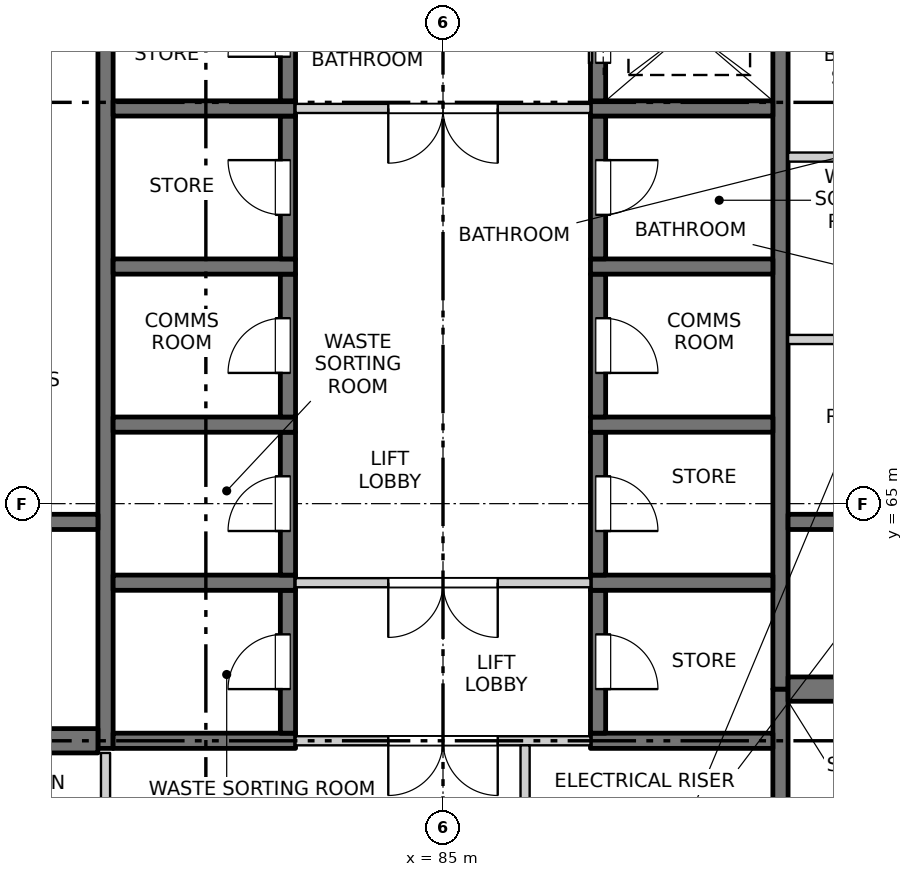
"""IFC4 building model, lengths in metres.
Left out: names, types, materials, properties, quantities, classifications, styles, units other than length and angle.
Written with IfcOpenShell. Run it as: python <this file> out.ifc"""

import sys

from ifc_helpers import new_model, si_unit, direction, frame, frame_2d, origin, place, context, subcontext, project, spatial, rectangle, extrude, element, fill, save


model = new_model("IFC4")
c1 = context("Model", 3, precision=1e-05, world=origin(), true_north=direction((0.0, 1.0)))
c2 = subcontext(c1, "Body", "Model", "MODEL_VIEW")
j1 = project(units=[si_unit("LENGTHUNIT", "METRE"), si_unit("PLANEANGLEUNIT", "RADIAN")], contexts=[c1])
p1 = place(None, origin())
s1 = spatial("IfcSite", under=j1, at=p1, CompositionType="ELEMENT")
p2 = place(p1, origin())
s2 = spatial("IfcBuilding", under=s1, at=p2, CompositionType="ELEMENT")
p3 = place(p2, frame((0.0, 0.0, 197.3)))
s3 = spatial("IfcBuildingStorey", under=s2, at=p3, CompositionType="ELEMENT", Elevation=197.3)
p4 = place(p3, frame((79.45, 60.975, -0.3), z_axis=(0.0, 0.0, 1.0), x_axis=(0.0, 1.0, 0.0)))
e1 = element("IfcWall", 1, at=p4, inside=s3, PredefinedType="SOLIDWALL", context=c2, shape_type="SweptSolid", body=[
    extrude(rectangle(XDim=16.325, YDim=0.25, at=frame_2d((8.163, 0.0))), origin(), (0.0, 0.0, 1.0), 3.45),
])
p5 = place(p3, frame((90.55, 55.45, -0.3), z_axis=(0.0, 0.0, 1.0), x_axis=(0.0, 1.0, 0.0)))
e2 = element("IfcWall", 2, at=p5, inside=s3, PredefinedType="SOLIDWALL", context=c2, shape_type="SweptSolid", body=[
    extrude(rectangle(XDim=6.5, YDim=0.25, at=frame_2d((3.25, 0.0))), origin(), (0.0, 0.0, 1.0), 3.45),
])
p6 = place(p3, frame((90.55, 61.95, -0.3), z_axis=(0.0, 0.0, 1.0), x_axis=(0.0, 1.0, 0.0)))
e3 = element("IfcWall", 3, at=p6, inside=s3, PredefinedType="SOLIDWALL", context=c2, shape_type="SweptSolid", body=[
    extrude(rectangle(XDim=15.35, YDim=0.25, at=frame_2d((7.675, 0.0))), origin(), (0.0, 0.0, 1.0), 3.45),
])
p7 = place(p3, frame((79.575, 61.1, -0.3), z_axis=(0.0, 0.0, 1.0), x_axis=(1.0, 0.0, 0.0)))
e4 = element("IfcWall", 4, at=p7, inside=s3, PredefinedType="SOLIDWALL", context=c2, shape_type="SweptSolid", body=[
    extrude(rectangle(XDim=3.0, YDim=0.25, at=frame_2d((1.5, 0.0))), origin(), (0.0, 0.0, 1.0), 3.45),
])
p8 = place(p3, frame((82.45, 61.225, -0.3), z_axis=(0.0, 0.0, 1.0), x_axis=(0.0, 1.0, 0.0)))
e5 = element("IfcWall", 5, at=p8, inside=s3, PredefinedType="SOLIDWALL", context=c2, shape_type="SweptSolid", body=[
    extrude(rectangle(XDim=2.35, YDim=0.25, at=frame_2d((1.175, 0.0))), origin(), (0.0, 0.0, 1.0), 3.45),
])
p9 = place(p8, frame((0.725, 0.0, 0.3)))
e6 = element("IfcOpeningElement", 6, at=p9, cuts=e5, PredefinedType="OPENING", context=c2, shape_type="SweptSolid", body=[
    extrude(rectangle(XDim=0.9, YDim=2.1, at=frame_2d((0.45, 1.05))), frame((0.0, 0.135, 0.0), z_axis=(0.0, -1.0, 0.0), x_axis=(1.0, 0.0, 0.0)), (0.0, 0.0, 1.0), 0.27),
])
p10 = place(p3, frame((79.575, 63.7, -0.3), z_axis=(0.0, 0.0, 1.0), x_axis=(1.0, 0.0, 0.0)))
e7 = element("IfcWall", 7, at=p10, inside=s3, PredefinedType="SOLIDWALL", context=c2, shape_type="SweptSolid", body=[
    extrude(rectangle(XDim=3.0, YDim=0.25, at=frame_2d((1.5, 0.0))), origin(), (0.0, 0.0, 1.0), 3.45),
])
p11 = place(p3, frame((82.45, 63.825, -0.3), z_axis=(0.0, 0.0, 1.0), x_axis=(0.0, 1.0, 0.0)))
e8 = element("IfcWall", 8, at=p11, inside=s3, PredefinedType="SOLIDWALL", context=c2, shape_type="SweptSolid", body=[
    extrude(rectangle(XDim=2.35, YDim=0.25, at=frame_2d((1.175, 0.0))), origin(), (0.0, 0.0, 1.0), 3.45),
])
p12 = place(p11, frame((0.725, 0.0, 0.3)))
e9 = element("IfcOpeningElement", 9, at=p12, cuts=e8, PredefinedType="OPENING", context=c2, shape_type="SweptSolid", body=[
    extrude(rectangle(XDim=0.9, YDim=2.1, at=frame_2d((0.45, 1.05))), frame((0.0, 0.135, 0.0), z_axis=(0.0, -1.0, 0.0), x_axis=(1.0, 0.0, 0.0)), (0.0, 0.0, 1.0), 0.27),
])
p13 = place(p3, frame((79.575, 66.3, -0.3), z_axis=(0.0, 0.0, 1.0), x_axis=(1.0, 0.0, 0.0)))
e10 = element("IfcWall", 10, at=p13, inside=s3, PredefinedType="SOLIDWALL", context=c2, shape_type="SweptSolid", body=[
    extrude(rectangle(XDim=3.0, YDim=0.25, at=frame_2d((1.5, 0.0))), origin(), (0.0, 0.0, 1.0), 3.45),
])
p14 = place(p3, frame((82.45, 66.425, -0.3), z_axis=(0.0, 0.0, 1.0), x_axis=(0.0, 1.0, 0.0)))
e11 = element("IfcWall", 11, at=p14, inside=s3, PredefinedType="SOLIDWALL", context=c2, shape_type="SweptSolid", body=[
    extrude(rectangle(XDim=2.35, YDim=0.25, at=frame_2d((1.175, 0.0))), origin(), (0.0, 0.0, 1.0), 3.45),
])
p15 = place(p14, frame((0.725, 0.0, 0.3)))
e12 = element("IfcOpeningElement", 12, at=p15, cuts=e11, PredefinedType="OPENING", context=c2, shape_type="SweptSolid", body=[
    extrude(rectangle(XDim=0.9, YDim=2.1, at=frame_2d((0.45, 1.05))), frame((0.0, 0.135, 0.0), z_axis=(0.0, -1.0, 0.0), x_axis=(1.0, 0.0, 0.0)), (0.0, 0.0, 1.0), 0.27),
])
p16 = place(p3, frame((79.575, 68.9, -0.3), z_axis=(0.0, 0.0, 1.0), x_axis=(1.0, 0.0, 0.0)))
e13 = element("IfcWall", 13, at=p16, inside=s3, PredefinedType="SOLIDWALL", context=c2, shape_type="SweptSolid", body=[
    extrude(rectangle(XDim=3.0, YDim=0.25, at=frame_2d((1.5, 0.0))), origin(), (0.0, 0.0, 1.0), 3.45),
])
p17 = place(p3, frame((82.45, 69.025, -0.3), z_axis=(0.0, 0.0, 1.0), x_axis=(0.0, 1.0, 0.0)))
e14 = element("IfcWall", 14, at=p17, inside=s3, PredefinedType="SOLIDWALL", context=c2, shape_type="SweptSolid", body=[
    extrude(rectangle(XDim=2.35, YDim=0.25, at=frame_2d((1.175, 0.0))), origin(), (0.0, 0.0, 1.0), 3.45),
])
p18 = place(p17, frame((0.725, 0.0, 0.3)))
e15 = element("IfcOpeningElement", 15, at=p18, cuts=e14, PredefinedType="OPENING", context=c2, shape_type="SweptSolid", body=[
    extrude(rectangle(XDim=0.9, YDim=2.1, at=frame_2d((0.45, 1.05))), frame((0.0, 0.135, 0.0), z_axis=(0.0, -1.0, 0.0), x_axis=(1.0, 0.0, 0.0)), (0.0, 0.0, 1.0), 0.27),
])
p19 = place(p3, frame((79.575, 71.5, -0.3), z_axis=(0.0, 0.0, 1.0), x_axis=(1.0, 0.0, 0.0)))
e16 = element("IfcWall", 16, at=p19, inside=s3, PredefinedType="SOLIDWALL", context=c2, shape_type="SweptSolid", body=[
    extrude(rectangle(XDim=3.0, YDim=0.25, at=frame_2d((1.5, 0.0))), origin(), (0.0, 0.0, 1.0), 3.45),
])
p20 = place(p3, frame((82.45, 71.625, -0.3), z_axis=(0.0, 0.0, 1.0), x_axis=(0.0, 1.0, 0.0)))
e17 = element("IfcWall", 17, at=p20, inside=s3, PredefinedType="SOLIDWALL", context=c2, shape_type="SweptSolid", body=[
    extrude(rectangle(XDim=2.35, YDim=0.25, at=frame_2d((1.175, 0.0))), origin(), (0.0, 0.0, 1.0), 3.45),
])
p21 = place(p20, frame((0.725, 0.0, 0.3)))
e18 = element("IfcOpeningElement", 18, at=p21, cuts=e17, PredefinedType="OPENING", context=c2, shape_type="SweptSolid", body=[
    extrude(rectangle(XDim=0.9, YDim=2.1, at=frame_2d((0.45, 1.05))), frame((0.0, 0.135, 0.0), z_axis=(0.0, -1.0, 0.0), x_axis=(1.0, 0.0, 0.0)), (0.0, 0.0, 1.0), 0.27),
])
p22 = place(p3, frame((87.425, 61.1, -0.3), z_axis=(0.0, 0.0, 1.0), x_axis=(1.0, 0.0, 0.0)))
e19 = element("IfcWall", 19, at=p22, inside=s3, PredefinedType="SOLIDWALL", context=c2, shape_type="SweptSolid", body=[
    extrude(rectangle(XDim=3.0, YDim=0.25, at=frame_2d((1.5, 0.0))), origin(), (0.0, 0.0, 1.0), 3.45),
])
p23 = place(p3, frame((87.55, 61.225, -0.3), z_axis=(0.0, 0.0, 1.0), x_axis=(0.0, 1.0, 0.0)))
e20 = element("IfcWall", 20, at=p23, inside=s3, PredefinedType="SOLIDWALL", context=c2, shape_type="SweptSolid", body=[
    extrude(rectangle(XDim=2.35, YDim=0.25, at=frame_2d((1.175, 0.0))), origin(), (0.0, 0.0, 1.0), 3.45),
])
p24 = place(p23, frame((0.725, 0.0, 0.3)))
e21 = element("IfcOpeningElement", 21, at=p24, cuts=e20, PredefinedType="OPENING", context=c2, shape_type="SweptSolid", body=[
    extrude(rectangle(XDim=0.9, YDim=2.1, at=frame_2d((0.45, 1.05))), frame((0.0, 0.135, 0.0), z_axis=(0.0, -1.0, 0.0), x_axis=(1.0, 0.0, 0.0)), (0.0, 0.0, 1.0), 0.27),
])
p25 = place(p3, frame((87.425, 63.7, -0.3), z_axis=(0.0, 0.0, 1.0), x_axis=(1.0, 0.0, 0.0)))
e22 = element("IfcWall", 22, at=p25, inside=s3, PredefinedType="SOLIDWALL", context=c2, shape_type="SweptSolid", body=[
    extrude(rectangle(XDim=3.0, YDim=0.25, at=frame_2d((1.5, 0.0))), origin(), (0.0, 0.0, 1.0), 3.45),
])
p26 = place(p3, frame((87.55, 63.825, -0.3), z_axis=(0.0, 0.0, 1.0), x_axis=(0.0, 1.0, 0.0)))
e23 = element("IfcWall", 23, at=p26, inside=s3, PredefinedType="SOLIDWALL", context=c2, shape_type="SweptSolid", body=[
    extrude(rectangle(XDim=2.35, YDim=0.25, at=frame_2d((1.175, 0.0))), origin(), (0.0, 0.0, 1.0), 3.45),
])
p27 = place(p26, frame((0.725, 0.0, 0.3)))
e24 = element("IfcOpeningElement", 24, at=p27, cuts=e23, PredefinedType="OPENING", context=c2, shape_type="SweptSolid", body=[
    extrude(rectangle(XDim=0.9, YDim=2.1, at=frame_2d((0.45, 1.05))), frame((0.0, 0.135, 0.0), z_axis=(0.0, -1.0, 0.0), x_axis=(1.0, 0.0, 0.0)), (0.0, 0.0, 1.0), 0.27),
])
p28 = place(p3, frame((87.425, 66.3, -0.3), z_axis=(0.0, 0.0, 1.0), x_axis=(1.0, 0.0, 0.0)))
e25 = element("IfcWall", 25, at=p28, inside=s3, PredefinedType="SOLIDWALL", context=c2, shape_type="SweptSolid", body=[
    extrude(rectangle(XDim=3.0, YDim=0.25, at=frame_2d((1.5, 0.0))), origin(), (0.0, 0.0, 1.0), 3.45),
])
p29 = place(p3, frame((87.55, 66.425, -0.3), z_axis=(0.0, 0.0, 1.0), x_axis=(0.0, 1.0, 0.0)))
e26 = element("IfcWall", 26, at=p29, inside=s3, PredefinedType="SOLIDWALL", context=c2, shape_type="SweptSolid", body=[
    extrude(rectangle(XDim=2.35, YDim=0.25, at=frame_2d((1.175, 0.0))), origin(), (0.0, 0.0, 1.0), 3.45),
])
p30 = place(p29, frame((0.725, 0.0, 0.3)))
e27 = element("IfcOpeningElement", 27, at=p30, cuts=e26, PredefinedType="OPENING", context=c2, shape_type="SweptSolid", body=[
    extrude(rectangle(XDim=0.9, YDim=2.1, at=frame_2d((0.45, 1.05))), frame((0.0, 0.135, 0.0), z_axis=(0.0, -1.0, 0.0), x_axis=(1.0, 0.0, 0.0)), (0.0, 0.0, 1.0), 0.27),
])
p31 = place(p3, frame((87.425, 68.9, -0.3), z_axis=(0.0, 0.0, 1.0), x_axis=(1.0, 0.0, 0.0)))
e28 = element("IfcWall", 28, at=p31, inside=s3, PredefinedType="SOLIDWALL", context=c2, shape_type="SweptSolid", body=[
    extrude(rectangle(XDim=3.0, YDim=0.25, at=frame_2d((1.5, 0.0))), origin(), (0.0, 0.0, 1.0), 3.45),
])
p32 = place(p3, frame((87.55, 69.025, -0.3), z_axis=(0.0, 0.0, 1.0), x_axis=(0.0, 1.0, 0.0)))
e29 = element("IfcWall", 29, at=p32, inside=s3, PredefinedType="SOLIDWALL", context=c2, shape_type="SweptSolid", body=[
    extrude(rectangle(XDim=2.35, YDim=0.25, at=frame_2d((1.175, 0.0))), origin(), (0.0, 0.0, 1.0), 3.45),
])
p33 = place(p32, frame((0.725, 0.0, 0.3)))
e30 = element("IfcOpeningElement", 30, at=p33, cuts=e29, PredefinedType="OPENING", context=c2, shape_type="SweptSolid", body=[
    extrude(rectangle(XDim=0.9, YDim=2.1, at=frame_2d((0.45, 1.05))), frame((0.0, 0.135, 0.0), z_axis=(0.0, -1.0, 0.0), x_axis=(1.0, 0.0, 0.0)), (0.0, 0.0, 1.0), 0.27),
])
p34 = place(p3, frame((87.425, 71.5, -0.3), z_axis=(0.0, 0.0, 1.0), x_axis=(1.0, 0.0, 0.0)))
e31 = element("IfcWall", 31, at=p34, inside=s3, PredefinedType="SOLIDWALL", context=c2, shape_type="SweptSolid", body=[
    extrude(rectangle(XDim=3.0, YDim=0.25, at=frame_2d((1.5, 0.0))), origin(), (0.0, 0.0, 1.0), 3.45),
])
p35 = place(p3, frame((87.55, 71.625, -0.3), z_axis=(0.0, 0.0, 1.0), x_axis=(0.0, 1.0, 0.0)))
e32 = element("IfcWall", 32, at=p35, inside=s3, PredefinedType="SOLIDWALL", context=c2, shape_type="SweptSolid", body=[
    extrude(rectangle(XDim=2.35, YDim=0.25, at=frame_2d((1.175, 0.0))), origin(), (0.0, 0.0, 1.0), 3.45),
])
p36 = place(p35, frame((0.625, 0.0, 0.3)))
e33 = element("IfcOpeningElement", 33, at=p36, cuts=e32, PredefinedType="OPENING", context=c2, shape_type="SweptSolid", body=[
    extrude(rectangle(XDim=1.1, YDim=2.1, at=frame_2d((0.55, 1.05))), frame((0.0, 0.135, 0.0), z_axis=(0.0, -1.0, 0.0), x_axis=(1.0, 0.0, 0.0)), (0.0, 0.0, 1.0), 0.27),
])
p37 = place(p3, frame((75.45, 61.1, -0.3), z_axis=(0.0, 0.0, 1.0), x_axis=(1.0, 0.0, 0.0)))
e34 = element("IfcWall", 34, at=p37, inside=s3, PredefinedType="SOLIDWALL", context=c2, shape_type="SweptSolid", body=[
    extrude(rectangle(XDim=3.875, YDim=0.4, at=frame_2d((1.938, 0.0))), origin(), (0.0, 0.0, 1.0), 3.45),
])
p38 = place(p3, frame((75.45, 64.7, -0.3), z_axis=(0.0, 0.0, 1.0), x_axis=(1.0, 0.0, 0.0)))
e35 = element("IfcWall", 35, at=p38, inside=s3, PredefinedType="SOLIDWALL", context=c2, shape_type="SweptSolid", body=[
    extrude(rectangle(XDim=3.875, YDim=0.25, at=frame_2d((1.938, 0.0))), origin(), (0.0, 0.0, 1.0), 3.45),
])
p39 = place(p3, frame((90.675, 61.95, -0.3), z_axis=(0.0, 0.0, 1.0), x_axis=(1.0, 0.0, 0.0)))
e36 = element("IfcWall", 36, at=p39, inside=s3, PredefinedType="SOLIDWALL", context=c2, shape_type="SweptSolid", body=[
    extrude(rectangle(XDim=3.875, YDim=0.4, at=frame_2d((1.938, 0.0))), origin(), (0.0, 0.0, 1.0), 3.45),
])
p40 = place(p3, frame((90.675, 64.7, -0.3), z_axis=(0.0, 0.0, 1.0), x_axis=(1.0, 0.0, 0.0)))
e37 = element("IfcWall", 37, at=p40, inside=s3, PredefinedType="SOLIDWALL", context=c2, shape_type="SweptSolid", body=[
    extrude(rectangle(XDim=3.875, YDim=0.25, at=frame_2d((1.938, 0.0))), origin(), (0.0, 0.0, 1.0), 3.45),
])
p41 = place(p3, frame((82.575, 61.1, 0.0), z_axis=(0.0, 0.0, 1.0), x_axis=(1.0, 0.0, 0.0)))
e38 = element("IfcWall", 38, at=p41, inside=s3, PredefinedType="PARTITIONING", context=c2, shape_type="SweptSolid", body=[
    extrude(rectangle(XDim=4.85, YDim=0.15, at=frame_2d((2.425, 0.0))), origin(), (0.0, 0.0, 1.0), 3.15),
])
p42 = place(p41, frame((1.525, 0.0, 0.0)))
e39 = element("IfcOpeningElement", 39, at=p42, cuts=e38, PredefinedType="OPENING", context=c2, shape_type="SweptSolid", body=[
    extrude(rectangle(XDim=1.8, YDim=2.1, at=frame_2d((0.9, 1.05))), frame((0.0, 0.085, 0.0), z_axis=(0.0, -1.0, 0.0), x_axis=(1.0, 0.0, 0.0)), (0.0, 0.0, 1.0), 0.17),
])
p43 = place(p3, frame((82.575, 63.7, 0.0), z_axis=(0.0, 0.0, 1.0), x_axis=(1.0, 0.0, 0.0)))
e40 = element("IfcWall", 40, at=p43, inside=s3, PredefinedType="PARTITIONING", context=c2, shape_type="SweptSolid", body=[
    extrude(rectangle(XDim=4.85, YDim=0.15, at=frame_2d((2.425, 0.0))), origin(), (0.0, 0.0, 1.0), 3.15),
])
p44 = place(p43, frame((1.525, 0.0, 0.0)))
e41 = element("IfcOpeningElement", 41, at=p44, cuts=e40, PredefinedType="OPENING", context=c2, shape_type="SweptSolid", body=[
    extrude(rectangle(XDim=1.8, YDim=2.1, at=frame_2d((0.9, 1.05))), frame((0.0, 0.085, 0.0), z_axis=(0.0, -1.0, 0.0), x_axis=(1.0, 0.0, 0.0)), (0.0, 0.0, 1.0), 0.17),
])
for number, where, z_axis, x_axis in (
    (42, (90.675, 67.7, 0.0), (0.0, 0.0, 1.0), (1.0, 0.0, 0.0)),
    (43, (90.675, 70.7, 0.0), (0.0, 0.0, 1.0), (1.0, 0.0, 0.0)),
):
    element("IfcWall", number, at=place(p3, frame(where, z_axis=z_axis, x_axis=x_axis)), inside=s3, PredefinedType="PARTITIONING", context=c2, shape_type="SweptSolid", body=[
        extrude(rectangle(XDim=3.875, YDim=0.15, at=frame_2d((1.938, 0.0))), origin(), (0.0, 0.0, 1.0), 3.15),
    ])
p45 = place(p3, frame((82.575, 71.5, 0.0), z_axis=(0.0, 0.0, 1.0), x_axis=(1.0, 0.0, 0.0)))
e44 = element("IfcWall", 44, at=p45, inside=s3, PredefinedType="PARTITIONING", context=c2, shape_type="SweptSolid", body=[
    extrude(rectangle(XDim=4.85, YDim=0.15, at=frame_2d((2.425, 0.0))), origin(), (0.0, 0.0, 1.0), 3.15),
])
p46 = place(p45, frame((1.525, 0.0, 0.0)))
e45 = element("IfcOpeningElement", 45, at=p46, cuts=e44, PredefinedType="OPENING", context=c2, shape_type="SweptSolid", body=[
    extrude(rectangle(XDim=1.8, YDim=2.1, at=frame_2d((0.9, 1.05))), frame((0.0, 0.085, 0.0), z_axis=(0.0, -1.0, 0.0), x_axis=(1.0, 0.0, 0.0)), (0.0, 0.0, 1.0), 0.17),
])
p47 = place(p3, frame((79.45, 55.45, 0.0), z_axis=(0.0, 0.0, 1.0), x_axis=(0.0, 1.0, 0.0)))
e46 = element("IfcWall", 46, at=p47, inside=s3, PredefinedType="PARTITIONING", context=c2, shape_type="SweptSolid", body=[
    extrude(rectangle(XDim=5.45, YDim=0.15, at=frame_2d((2.725, 0.0))), origin(), (0.0, 0.0, 1.0), 3.15),
])
p48 = place(p47, frame((2.25, 0.0, 0.0)))
e47 = element("IfcOpeningElement", 47, at=p48, cuts=e46, PredefinedType="OPENING", context=c2, shape_type="SweptSolid", body=[
    extrude(rectangle(XDim=0.9, YDim=2.1, at=frame_2d((0.45, 1.05))), frame((0.0, 0.085, 0.0), z_axis=(0.0, -1.0, 0.0), x_axis=(1.0, 0.0, 0.0)), (0.0, 0.0, 1.0), 0.17),
])
p49 = place(p3, frame((86.35, 55.45, 0.0), z_axis=(0.0, 0.0, 1.0), x_axis=(0.0, 1.0, 0.0)))
e48 = element("IfcWall", 48, at=p49, inside=s3, PredefinedType="PARTITIONING", context=c2, shape_type="SweptSolid", body=[
    extrude(rectangle(XDim=5.575, YDim=0.15, at=frame_2d((2.788, 0.0))), origin(), (0.0, 0.0, 1.0), 3.15),
])
p50 = place(p49, frame((2.25, 0.0, 0.0)))
e49 = element("IfcOpeningElement", 49, at=p50, cuts=e48, PredefinedType="OPENING", context=c2, shape_type="SweptSolid", body=[
    extrude(rectangle(XDim=0.9, YDim=2.1, at=frame_2d((0.45, 1.05))), frame((0.0, 0.085, 0.0), z_axis=(0.0, -1.0, 0.0), x_axis=(1.0, 0.0, 0.0)), (0.0, 0.0, 1.0), 0.17),
])
p51 = place(p42, origin())
e50 = element("IfcDoor", 50, at=p51, inside=s3, OperationType="DOUBLE_DOOR_SINGLE_SWING", PredefinedType="DOOR", context=c2, shape_type="SweptSolid", body=[
    extrude(rectangle(XDim=1.8, YDim=2.1, at=frame_2d((0.9, 1.05))), frame((0.0, 0.025, 0.0), z_axis=(0.0, -1.0, 0.0), x_axis=(1.0, 0.0, 0.0)), (0.0, 0.0, 1.0), 0.05),
])
fill(e39, e50)
p52 = place(p9, origin())
e51 = element("IfcDoor", 51, at=p52, inside=s3, OperationType="SINGLE_SWING_LEFT", PredefinedType="DOOR", context=c2, shape_type="SweptSolid", body=[
    extrude(rectangle(XDim=0.9, YDim=2.1, at=frame_2d((0.45, 1.05))), frame((0.0, 0.11, 0.0), z_axis=(0.0, -1.0, 0.0), x_axis=(1.0, 0.0, 0.0)), (0.0, 0.0, 1.0), 0.05),
])
fill(e6, e51)
p53 = place(p24, origin())
e52 = element("IfcDoor", 52, at=p53, inside=s3, OperationType="SINGLE_SWING_RIGHT", PredefinedType="DOOR", context=c2, shape_type="SweptSolid", body=[
    extrude(rectangle(XDim=0.9, YDim=2.1, at=frame_2d((0.45, 1.05))), frame((0.0, -0.06, 0.0), z_axis=(0.0, -1.0, 0.0), x_axis=(1.0, 0.0, 0.0)), (0.0, 0.0, 1.0), 0.05),
])
fill(e21, e52)
p54 = place(p44, origin())
e53 = element("IfcDoor", 53, at=p54, inside=s3, OperationType="DOUBLE_DOOR_SINGLE_SWING", PredefinedType="DOOR", context=c2, shape_type="SweptSolid", body=[
    extrude(rectangle(XDim=1.8, YDim=2.1, at=frame_2d((0.9, 1.05))), frame((0.0, 0.025, 0.0), z_axis=(0.0, -1.0, 0.0), x_axis=(1.0, 0.0, 0.0)), (0.0, 0.0, 1.0), 0.05),
])
fill(e41, e53)
p55 = place(p12, origin())
e54 = element("IfcDoor", 54, at=p55, inside=s3, OperationType="SINGLE_SWING_LEFT", PredefinedType="DOOR", context=c2, shape_type="SweptSolid", body=[
    extrude(rectangle(XDim=0.9, YDim=2.1, at=frame_2d((0.45, 1.05))), frame((0.0, 0.11, 0.0), z_axis=(0.0, -1.0, 0.0), x_axis=(1.0, 0.0, 0.0)), (0.0, 0.0, 1.0), 0.05),
])
fill(e9, e54)
p56 = place(p27, origin())
e55 = element("IfcDoor", 55, at=p56, inside=s3, OperationType="SINGLE_SWING_RIGHT", PredefinedType="DOOR", context=c2, shape_type="SweptSolid", body=[
    extrude(rectangle(XDim=0.9, YDim=2.1, at=frame_2d((0.45, 1.05))), frame((0.0, -0.06, 0.0), z_axis=(0.0, -1.0, 0.0), x_axis=(1.0, 0.0, 0.0)), (0.0, 0.0, 1.0), 0.05),
])
fill(e24, e55)
p57 = place(p15, origin())
e56 = element("IfcDoor", 56, at=p57, inside=s3, OperationType="SINGLE_SWING_LEFT", PredefinedType="DOOR", context=c2, shape_type="SweptSolid", body=[
    extrude(rectangle(XDim=0.9, YDim=2.1, at=frame_2d((0.45, 1.05))), frame((0.0, 0.11, 0.0), z_axis=(0.0, -1.0, 0.0), x_axis=(1.0, 0.0, 0.0)), (0.0, 0.0, 1.0), 0.05),
])
fill(e12, e56)
p58 = place(p30, origin())
e57 = element("IfcDoor", 57, at=p58, inside=s3, OperationType="SINGLE_SWING_RIGHT", PredefinedType="DOOR", context=c2, shape_type="SweptSolid", body=[
    extrude(rectangle(XDim=0.9, YDim=2.1, at=frame_2d((0.45, 1.05))), frame((0.0, -0.06, 0.0), z_axis=(0.0, -1.0, 0.0), x_axis=(1.0, 0.0, 0.0)), (0.0, 0.0, 1.0), 0.05),
])
fill(e27, e57)
p59 = place(p18, origin())
e58 = element("IfcDoor", 58, at=p59, inside=s3, OperationType="SINGLE_SWING_RIGHT", PredefinedType="DOOR", context=c2, shape_type="SweptSolid", body=[
    extrude(rectangle(XDim=0.9, YDim=2.1, at=frame_2d((0.45, 1.05))), frame((0.0, 0.11, 0.0), z_axis=(0.0, -1.0, 0.0), x_axis=(1.0, 0.0, 0.0)), (0.0, 0.0, 1.0), 0.05),
])
fill(e15, e58)
p60 = place(p33, origin())
e59 = element("IfcDoor", 59, at=p60, inside=s3, OperationType="SINGLE_SWING_LEFT", PredefinedType="DOOR", context=c2, shape_type="SweptSolid", body=[
    extrude(rectangle(XDim=0.9, YDim=2.1, at=frame_2d((0.45, 1.05))), frame((0.0, -0.06, 0.0), z_axis=(0.0, -1.0, 0.0), x_axis=(1.0, 0.0, 0.0)), (0.0, 0.0, 1.0), 0.05),
])
fill(e30, e59)
p61 = place(p46, origin())
e60 = element("IfcDoor", 60, at=p61, inside=s3, OperationType="DOUBLE_DOOR_SINGLE_SWING", PredefinedType="DOOR", context=c2, shape_type="SweptSolid", body=[
    extrude(rectangle(XDim=1.8, YDim=2.1, at=frame_2d((0.9, 1.05))), frame((0.0, 0.025, 0.0), z_axis=(0.0, -1.0, 0.0), x_axis=(1.0, 0.0, 0.0)), (0.0, 0.0, 1.0), 0.05),
])
fill(e45, e60)
p62 = place(p21, origin())
e61 = element("IfcDoor", 61, at=p62, inside=s3, OperationType="SINGLE_SWING_LEFT", PredefinedType="DOOR", context=c2, shape_type="SweptSolid", body=[
    extrude(rectangle(XDim=0.9, YDim=2.1, at=frame_2d((0.45, 1.05))), frame((0.0, 0.11, 0.0), z_axis=(0.0, -1.0, 0.0), x_axis=(1.0, 0.0, 0.0)), (0.0, 0.0, 1.0), 0.05),
])
fill(e18, e61)
p63 = place(p36, origin())
e62 = element("IfcDoor", 62, at=p63, inside=s3, OperationType="SLIDING_TO_LEFT", PredefinedType="DOOR", context=c2, shape_type="SweptSolid", body=[
    extrude(rectangle(XDim=1.1, YDim=2.1, at=frame_2d((0.55, 1.05))), frame((0.0, -0.06, 0.0), z_axis=(0.0, -1.0, 0.0), x_axis=(1.0, 0.0, 0.0)), (0.0, 0.0, 1.0), 0.05),
])
fill(e33, e62)
save(model, sys.argv[1])
